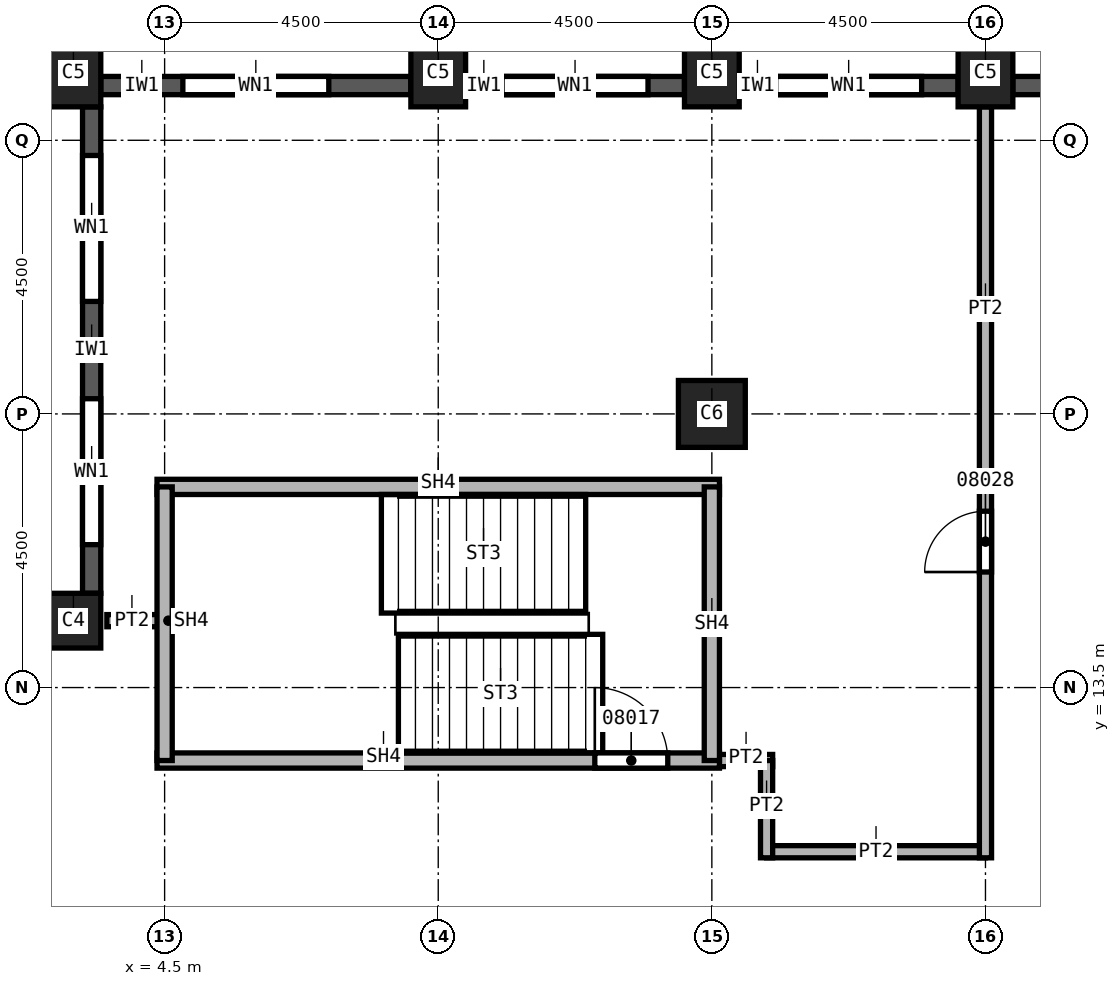
"""IFC4 building model, lengths in metres.
Left out: names, types, materials, properties, quantities, classifications, styles, units other than length and angle.
Written with IfcOpenShell. Run it as: python <this file> out.ifc"""

import sys

from ifc_helpers import new_model, si_unit, direction, frame, frame_2d, origin, origin_2d, place, context, subcontext, project, spatial, rectangle, extrude, element, fill, save


model = new_model("IFC4")
c1 = context("Model", 3, precision=1e-05, world=origin(), true_north=direction((0.0, 1.0)))
c2 = subcontext(c1, "Body", "Model", "MODEL_VIEW")
j1 = project(units=[si_unit("LENGTHUNIT", "METRE"), si_unit("PLANEANGLEUNIT", "RADIAN")], contexts=[c1])
p1 = place(None, origin())
s1 = spatial("IfcSite", under=j1, at=p1, CompositionType="ELEMENT")
p2 = place(p1, origin())
s2 = spatial("IfcBuilding", under=s1, at=p2, CompositionType="ELEMENT")
p3 = place(p2, frame((0.0, 0.0, 150.0)))
s3 = spatial("IfcBuildingStorey", under=s2, at=p3, CompositionType="ELEMENT", Elevation=150.0)
p4 = place(p3, frame((13.5, 18.0, 0.0), z_axis=(0.0, 0.0, 1.0), x_axis=(1.0, 0.0, 0.0)))
e1 = element("IfcColumn", 1, at=p4, inside=s3, PredefinedType="COLUMN", context=c2, shape_type="SweptSolid", body=[
    extrude(rectangle(XDim=1.1, YDim=1.1, at=origin_2d()), origin(), (0.0, 0.0, 1.0), 3.7),
])
for number, where, z_axis, x_axis in (
    (2, (3.0, 23.6, 0.0), (0.0, 0.0, 1.0), (1.0, 0.0, 0.0)),
    (3, (9.0, 23.6, 0.0), (0.0, 0.0, 1.0), (1.0, 0.0, 0.0)),
    (4, (13.5, 23.6, 0.0), (0.0, 0.0, 1.0), (1.0, 0.0, 0.0)),
    (5, (18.0, 23.6, 0.0), (0.0, 0.0, 1.0), (1.0, 0.0, 0.0)),
):
    element("IfcColumn", number, at=place(p3, frame(where, z_axis=z_axis, x_axis=x_axis)), inside=s3, PredefinedType="COLUMN", context=c2, shape_type="SweptSolid", body=[
        extrude(rectangle(XDim=0.9, YDim=1.1, at=origin_2d()), origin(), (0.0, 0.0, 1.0), 3.7),
    ])
p5 = place(p3, frame((3.0, 14.6, 0.0), z_axis=(0.0, 0.0, 1.0), x_axis=(1.0, 0.0, 0.0)))
e6 = element("IfcColumn", 6, at=p5, inside=s3, PredefinedType="COLUMN", context=c2, shape_type="SweptSolid", body=[
    extrude(rectangle(XDim=0.9, YDim=0.9, at=origin_2d()), origin(), (0.0, 0.0, 1.0), 3.7),
])
p6 = place(p3, frame((22.05, 23.4, 0.0), z_axis=(0.0, 0.0, 1.0), x_axis=(-1.0, 0.0, 0.0)))
e7 = element("IfcWall", 7, at=p6, inside=s3, PredefinedType="SOLIDWALL", context=c2, shape_type="SweptSolid", body=[
    extrude(rectangle(XDim=3.6, YDim=0.3, at=frame_2d((1.8, 0.0))), origin(), (0.0, 0.0, 1.0), 3.1),
])
p7 = place(p6, frame((0.775, 0.0, 0.8)))
e8 = element("IfcOpeningElement", 8, at=p7, cuts=e7, PredefinedType="OPENING", context=c2, shape_type="SweptSolid", body=[
    extrude(rectangle(XDim=1.0, YDim=1.95, at=frame_2d((0.5, 0.975))), frame((0.0, 0.15, 0.0), z_axis=(0.0, -1.0, 0.0), x_axis=(1.0, 0.0, 0.0)), (0.0, 0.0, 1.0), 0.3),
])
p8 = place(p6, frame((2.375, 0.0, 0.8)))
e9 = element("IfcOpeningElement", 9, at=p8, cuts=e7, PredefinedType="OPENING", context=c2, shape_type="SweptSolid", body=[
    extrude(rectangle(XDim=0.6, YDim=1.95, at=frame_2d((0.3, 0.975))), frame((0.0, 0.15, 0.0), z_axis=(0.0, -1.0, 0.0), x_axis=(1.0, 0.0, 0.0)), (0.0, 0.0, 1.0), 0.3),
])
p9 = place(p3, frame((17.55, 23.4, 0.0), z_axis=(0.0, 0.0, 1.0), x_axis=(-1.0, 0.0, 0.0)))
e10 = element("IfcWall", 10, at=p9, inside=s3, PredefinedType="SOLIDWALL", context=c2, shape_type="SweptSolid", body=[
    extrude(rectangle(XDim=3.6, YDim=0.3, at=frame_2d((1.8, 0.0))), origin(), (0.0, 0.0, 1.0), 3.1),
])
p10 = place(p9, frame((0.6, 0.0, 0.8)))
e11 = element("IfcOpeningElement", 11, at=p10, cuts=e10, PredefinedType="OPENING", context=c2, shape_type="SweptSolid", body=[
    extrude(rectangle(XDim=2.4, YDim=1.95, at=frame_2d((1.2, 0.975))), frame((0.0, 0.15, 0.0), z_axis=(0.0, -1.0, 0.0), x_axis=(1.0, 0.0, 0.0)), (0.0, 0.0, 1.0), 0.3),
])
p11 = place(p3, frame((13.05, 23.4, 0.0), z_axis=(0.0, 0.0, 1.0), x_axis=(-1.0, 0.0, 0.0)))
e12 = element("IfcWall", 12, at=p11, inside=s3, PredefinedType="SOLIDWALL", context=c2, shape_type="SweptSolid", body=[
    extrude(rectangle(XDim=3.6, YDim=0.3, at=frame_2d((1.8, 0.0))), origin(), (0.0, 0.0, 1.0), 3.1),
])
p12 = place(p11, frame((0.6, 0.0, 0.8)))
e13 = element("IfcOpeningElement", 13, at=p12, cuts=e12, PredefinedType="OPENING", context=c2, shape_type="SweptSolid", body=[
    extrude(rectangle(XDim=2.4, YDim=1.95, at=frame_2d((1.2, 0.975))), frame((0.0, 0.15, 0.0), z_axis=(0.0, -1.0, 0.0), x_axis=(1.0, 0.0, 0.0)), (0.0, 0.0, 1.0), 0.3),
])
p13 = place(p3, frame((8.55, 23.4, 0.0), z_axis=(0.0, 0.0, 1.0), x_axis=(-1.0, 0.0, 0.0)))
e14 = element("IfcWall", 14, at=p13, inside=s3, PredefinedType="SOLIDWALL", context=c2, shape_type="SweptSolid", body=[
    extrude(rectangle(XDim=5.1, YDim=0.3, at=frame_2d((2.55, 0.0))), origin(), (0.0, 0.0, 1.0), 3.1),
])
p14 = place(p13, frame((1.35, 0.0, 0.8)))
e15 = element("IfcOpeningElement", 15, at=p14, cuts=e14, PredefinedType="OPENING", context=c2, shape_type="SweptSolid", body=[
    extrude(rectangle(XDim=2.4, YDim=1.95, at=frame_2d((1.2, 0.975))), frame((0.0, 0.15, 0.0), z_axis=(0.0, -1.0, 0.0), x_axis=(1.0, 0.0, 0.0)), (0.0, 0.0, 1.0), 0.3),
])
p15 = place(p3, frame((3.3, 23.05, 0.0), z_axis=(0.0, 0.0, 1.0), x_axis=(0.0, -1.0, 0.0)))
e16 = element("IfcWall", 16, at=p15, inside=s3, PredefinedType="SOLIDWALL", context=c2, shape_type="SweptSolid", body=[
    extrude(rectangle(XDim=8.0, YDim=0.3, at=frame_2d((4.0, 0.0))), origin(), (0.0, 0.0, 1.0), 3.1),
])
p16 = place(p15, frame((0.8, 0.0, 0.8)))
e17 = element("IfcOpeningElement", 17, at=p16, cuts=e16, PredefinedType="OPENING", context=c2, shape_type="SweptSolid", body=[
    extrude(rectangle(XDim=2.4, YDim=1.95, at=frame_2d((1.2, 0.975))), frame((0.0, 0.15, 0.0), z_axis=(0.0, -1.0, 0.0), x_axis=(1.0, 0.0, 0.0)), (0.0, 0.0, 1.0), 0.3),
])
p17 = place(p15, frame((4.8, 0.0, 0.8)))
e18 = element("IfcOpeningElement", 18, at=p17, cuts=e16, PredefinedType="OPENING", context=c2, shape_type="SweptSolid", body=[
    extrude(rectangle(XDim=2.4, YDim=1.95, at=frame_2d((1.2, 0.975))), frame((0.0, 0.15, 0.0), z_axis=(0.0, -1.0, 0.0), x_axis=(1.0, 0.0, 0.0)), (0.0, 0.0, 1.0), 0.3),
])
p18 = place(p3, frame((3.55, 14.6, 0.0), z_axis=(0.0, 0.0, 1.0), x_axis=(1.0, 0.0, 0.0)))
e19 = element("IfcWall", 19, at=p18, inside=s3, PredefinedType="PARTITIONING", context=c2, shape_type="SweptSolid", body=[
    extrude(rectangle(XDim=0.95, YDim=0.2, at=frame_2d((0.475, 0.0))), origin(), (0.0, 0.0, 1.0), 3.7),
])
p19 = place(p3, frame((13.375, 12.3, 0.0), z_axis=(0.0, 0.0, 1.0), x_axis=(1.0, 0.0, 0.0)))
e20 = element("IfcWall", 20, at=p19, inside=s3, PredefinedType="PARTITIONING", context=c2, shape_type="SweptSolid", body=[
    extrude(rectangle(XDim=1.125, YDim=0.2, at=frame_2d((0.562, 0.0))), origin(), (0.0, 0.0, 1.0), 3.7),
])
p20 = place(p3, frame((14.4, 10.8, 0.0), z_axis=(0.0, 0.0, 1.0), x_axis=(1.0, 0.0, 0.0)))
e21 = element("IfcWall", 21, at=p20, inside=s3, PredefinedType="PARTITIONING", context=c2, shape_type="SweptSolid", body=[
    extrude(rectangle(XDim=3.6, YDim=0.2, at=frame_2d((1.8, 0.0))), origin(), (0.0, 0.0, 1.0), 3.7),
])
p21 = place(p3, frame((14.4, 12.3, 0.0), z_axis=(0.0, 0.0, 1.0), x_axis=(0.0, -1.0, 0.0)))
e22 = element("IfcWall", 22, at=p21, inside=s3, PredefinedType="PARTITIONING", context=c2, shape_type="SweptSolid", body=[
    extrude(rectangle(XDim=1.6, YDim=0.2, at=frame_2d((0.8, 0.0))), origin(), (0.0, 0.0, 1.0), 3.7),
])
p22 = place(p3, frame((18.0, 10.7, 0.0), z_axis=(0.0, 0.0, 1.0), x_axis=(0.0, 1.0, 0.0)))
e23 = element("IfcWall", 23, at=p22, inside=s3, PredefinedType="PARTITIONING", context=c2, shape_type="SweptSolid", body=[
    extrude(rectangle(XDim=12.35, YDim=0.2, at=frame_2d((6.175, 0.0))), origin(), (0.0, 0.0, 1.0), 3.7),
])
p23 = place(p22, frame((4.7, 0.0, 0.0)))
e24 = element("IfcOpeningElement", 24, at=p23, cuts=e23, PredefinedType="OPENING", context=c2, shape_type="SweptSolid", body=[
    extrude(rectangle(XDim=1.0, YDim=2.1, at=frame_2d((0.5, 1.05))), frame((0.0, 0.1, 0.0), z_axis=(0.0, -1.0, 0.0), x_axis=(1.0, 0.0, 0.0)), (0.0, 0.0, 1.0), 0.2),
])
p24 = place(p3, frame((4.375, 12.3, 0.0), z_axis=(0.0, 0.0, 1.0), x_axis=(1.0, 0.0, 0.0)))
e25 = element("IfcWall", 25, at=p24, inside=s3, PredefinedType="SOLIDWALL", context=c2, shape_type="SweptSolid", body=[
    extrude(rectangle(XDim=9.25, YDim=0.25, at=frame_2d((4.625, 0.0))), origin(), (0.0, 0.0, 1.0), 3.7),
])
p25 = place(p24, frame((7.2, 0.0, 0.0)))
e26 = element("IfcOpeningElement", 26, at=p25, cuts=e25, PredefinedType="OPENING", context=c2, shape_type="SweptSolid", body=[
    extrude(rectangle(XDim=1.2, YDim=2.1, at=frame_2d((0.6, 1.05))), frame((0.0, 0.125, 0.0), z_axis=(0.0, -1.0, 0.0), x_axis=(1.0, 0.0, 0.0)), (0.0, 0.0, 1.0), 0.25),
])
p26 = place(p3, frame((4.375, 16.8, 0.0), z_axis=(0.0, 0.0, 1.0), x_axis=(1.0, 0.0, 0.0)))
e27 = element("IfcWall", 27, at=p26, inside=s3, PredefinedType="SOLIDWALL", context=c2, shape_type="SweptSolid", body=[
    extrude(rectangle(XDim=9.25, YDim=0.25, at=frame_2d((4.625, 0.0))), origin(), (0.0, 0.0, 1.0), 3.7),
])
for number, where, z_axis, x_axis in (
    (28, (4.5, 12.3, 0.0), (0.0, 0.0, 1.0), (0.0, 1.0, 0.0)),
    (29, (13.5, 16.8, 0.0), (0.0, 0.0, 1.0), (0.0, -1.0, 0.0)),
):
    element("IfcWall", number, at=place(p3, frame(where, z_axis=z_axis, x_axis=x_axis)), inside=s3, PredefinedType="SOLIDWALL", context=c2, shape_type="SweptSolid", body=[
        extrude(rectangle(XDim=4.5, YDim=0.25, at=frame_2d((2.25, 0.0))), origin(), (0.0, 0.0, 1.0), 3.7),
    ])
p27 = place(p10, origin())
e30 = element("IfcWindow", 30, at=p27, inside=s3, PartitioningType="SINGLE_PANEL", PredefinedType="WINDOW", context=c2, shape_type="SweptSolid", body=[
    extrude(rectangle(XDim=2.4, YDim=1.95, at=frame_2d((1.2, 0.975))), frame((0.0, 0.03, 0.0), z_axis=(0.0, -1.0, 0.0), x_axis=(1.0, 0.0, 0.0)), (0.0, 0.0, 1.0), 0.06),
])
fill(e11, e30)
p28 = place(p12, origin())
e31 = element("IfcWindow", 31, at=p28, inside=s3, PartitioningType="SINGLE_PANEL", PredefinedType="WINDOW", context=c2, shape_type="SweptSolid", body=[
    extrude(rectangle(XDim=2.4, YDim=1.95, at=frame_2d((1.2, 0.975))), frame((0.0, 0.03, 0.0), z_axis=(0.0, -1.0, 0.0), x_axis=(1.0, 0.0, 0.0)), (0.0, 0.0, 1.0), 0.06),
])
fill(e13, e31)
p29 = place(p14, origin())
e32 = element("IfcWindow", 32, at=p29, inside=s3, PartitioningType="SINGLE_PANEL", PredefinedType="WINDOW", context=c2, shape_type="SweptSolid", body=[
    extrude(rectangle(XDim=2.4, YDim=1.95, at=frame_2d((1.2, 0.975))), frame((0.0, 0.03, 0.0), z_axis=(0.0, -1.0, 0.0), x_axis=(1.0, 0.0, 0.0)), (0.0, 0.0, 1.0), 0.06),
])
fill(e15, e32)
p30 = place(p16, origin())
e33 = element("IfcWindow", 33, at=p30, inside=s3, PartitioningType="SINGLE_PANEL", PredefinedType="WINDOW", context=c2, shape_type="SweptSolid", body=[
    extrude(rectangle(XDim=2.4, YDim=1.95, at=frame_2d((1.2, 0.975))), frame((0.0, 0.03, 0.0), z_axis=(0.0, -1.0, 0.0), x_axis=(1.0, 0.0, 0.0)), (0.0, 0.0, 1.0), 0.06),
])
fill(e17, e33)
p31 = place(p17, origin())
e34 = element("IfcWindow", 34, at=p31, inside=s3, PartitioningType="SINGLE_PANEL", PredefinedType="WINDOW", context=c2, shape_type="SweptSolid", body=[
    extrude(rectangle(XDim=2.4, YDim=1.95, at=frame_2d((1.2, 0.975))), frame((0.0, 0.03, 0.0), z_axis=(0.0, -1.0, 0.0), x_axis=(1.0, 0.0, 0.0)), (0.0, 0.0, 1.0), 0.06),
])
fill(e18, e34)
p32 = place(p25, origin())
e35 = element("IfcDoor", 35, at=p32, inside=s3, OperationType="SINGLE_SWING_RIGHT", PredefinedType="DOOR", context=c2, shape_type="SweptSolid", body=[
    extrude(rectangle(XDim=1.2, YDim=2.1, at=frame_2d((0.6, 1.05))), frame((0.0, 0.025, 0.0), z_axis=(0.0, -1.0, 0.0), x_axis=(1.0, 0.0, 0.0)), (0.0, 0.0, 1.0), 0.05),
])
fill(e26, e35)
p33 = place(p23, origin())
e36 = element("IfcDoor", 36, at=p33, inside=s3, OperationType="SINGLE_SWING_LEFT", PredefinedType="DOOR", context=c2, shape_type="SweptSolid", body=[
    extrude(rectangle(XDim=1.0, YDim=2.1, at=frame_2d((0.5, 1.05))), frame((0.0, 0.025, 0.0), z_axis=(0.0, -1.0, 0.0), x_axis=(1.0, 0.0, 0.0)), (0.0, 0.0, 1.0), 0.05),
])
fill(e24, e36)
save(model, sys.argv[1])
